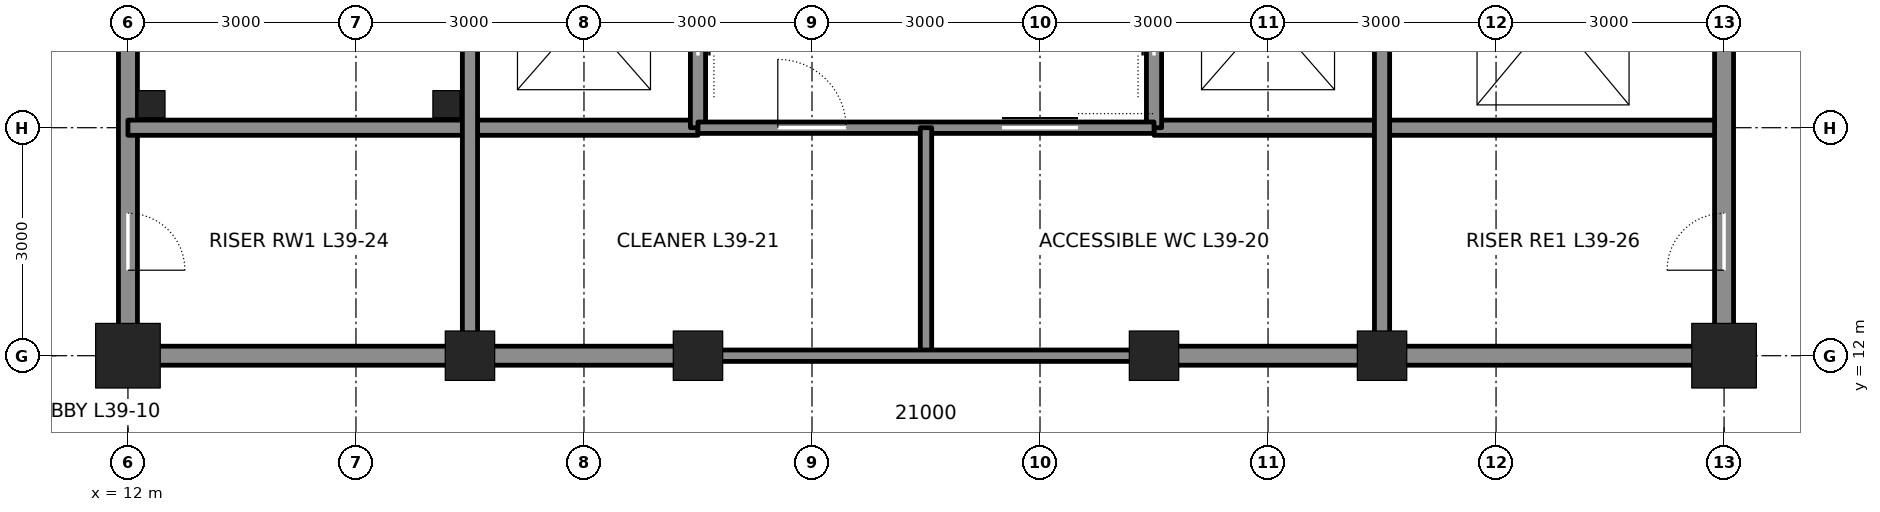
"""IFC4 building model, lengths in metres.
Left out: names, types, materials, properties, quantities, classifications, styles, units other than length and angle.
Written with IfcOpenShell. Run it as: python <this file> out.ifc"""

import sys

from ifc_helpers import new_model, si_unit, direction, frame, frame_2d, origin, origin_2d, place, context, subcontext, project, spatial, rectangle, hollow_rectangle, extrude, element, fill, save


model = new_model("IFC4")
c1 = context("Model", 3, precision=1e-05, world=origin(), true_north=direction((0.0, 1.0)))
c2 = subcontext(c1, "Body", "Model", "MODEL_VIEW")
j1 = project(units=[si_unit("LENGTHUNIT", "METRE"), si_unit("PLANEANGLEUNIT", "RADIAN")], contexts=[c1])
p1 = place(None, origin())
s1 = spatial("IfcSite", under=j1, at=p1, CompositionType="ELEMENT")
p2 = place(p1, origin())
s2 = spatial("IfcBuilding", under=s1, at=p2, CompositionType="ELEMENT")
p3 = place(p2, frame((0.0, 0.0, 180.0)))
s3 = spatial("IfcBuildingStorey", under=s2, at=p3, CompositionType="ELEMENT", Elevation=180.0)
p4 = place(p3, frame((12.0, 12.0, 0.0), z_axis=(0.0, 0.0, 1.0), x_axis=(1.0, 0.0, 0.0)))
e1 = element("IfcColumn", 1, at=p4, inside=s3, PredefinedType="COLUMN", context=c2, shape_type="SweptSolid", body=[
    extrude(hollow_rectangle(XDim=0.85, YDim=0.85, WallThickness=0.085, at=origin_2d()), origin(), (0.0, 0.0, 1.0), 4.5),
])
for number, where, z_axis, x_axis in (
    (2, (16.5, 12.0, 0.0), (0.0, 0.0, 1.0), (1.0, 0.0, 0.0)),
    (3, (19.5, 12.0, 0.0), (0.0, 0.0, 1.0), (1.0, 0.0, 0.0)),
    (4, (25.5, 12.0, 0.0), (0.0, 0.0, 1.0), (1.0, 0.0, 0.0)),
    (5, (28.5, 12.0, 0.0), (0.0, 0.0, 1.0), (1.0, 0.0, 0.0)),
):
    element("IfcColumn", number, at=place(p3, frame(where, z_axis=z_axis, x_axis=x_axis)), inside=s3, PredefinedType="COLUMN", context=c2, shape_type="SweptSolid", body=[
        extrude(hollow_rectangle(XDim=0.65, YDim=0.65, WallThickness=0.065, at=origin_2d()), origin(), (0.0, 0.0, 1.0), 4.5),
    ])
p5 = place(p3, frame((33.0, 12.0, 0.0), z_axis=(0.0, 0.0, 1.0), x_axis=(1.0, 0.0, 0.0)))
e6 = element("IfcColumn", 6, at=p5, inside=s3, PredefinedType="COLUMN", context=c2, shape_type="SweptSolid", body=[
    extrude(hollow_rectangle(XDim=0.85, YDim=0.85, WallThickness=0.085, at=origin_2d()), origin(), (0.0, 0.0, 1.0), 4.5),
])
p6 = place(p3, frame((12.0, 12.25, 0.0), z_axis=(0.0, 0.0, 1.0), x_axis=(0.0, 1.0, 0.0)))
e7 = element("IfcWall", 7, at=p6, inside=s3, PredefinedType="SOLIDWALL", context=c2, shape_type="SweptSolid", body=[
    extrude(rectangle(XDim=8.5, YDim=0.25, at=frame_2d((4.25, 0.0))), origin(), (0.0, 0.0, 1.0), 3.413),
])
p7 = place(p6, frame((0.875, 0.0, 0.0)))
e8 = element("IfcOpeningElement", 8, at=p7, cuts=e7, PredefinedType="OPENING", context=c2, shape_type="SweptSolid", body=[
    extrude(rectangle(XDim=0.75, YDim=2.1, at=frame_2d((0.375, 1.05))), frame((0.0, 0.135, 0.0), z_axis=(0.0, -1.0, 0.0), x_axis=(1.0, 0.0, 0.0)), (0.0, 0.0, 1.0), 0.27),
])
p8 = place(p3, frame((12.25, 12.0, 0.0), z_axis=(0.0, 0.0, 1.0), x_axis=(1.0, 0.0, 0.0)))
e9 = element("IfcWall", 9, at=p8, inside=s3, PredefinedType="SOLIDWALL", context=c2, shape_type="SweptSolid", body=[
    extrude(rectangle(XDim=4.0, YDim=0.25, at=frame_2d((2.0, 0.0))), origin(), (0.0, 0.0, 1.0), 3.481),
])
for number, where, z_axis, x_axis in (
    (10, (16.75, 12.0, 0.0), (0.0, 0.0, 1.0), (1.0, 0.0, 0.0)),
    (11, (25.75, 12.0, 0.0), (0.0, 0.0, 1.0), (1.0, 0.0, 0.0)),
):
    element("IfcWall", number, at=place(p3, frame(where, z_axis=z_axis, x_axis=x_axis)), inside=s3, PredefinedType="SOLIDWALL", context=c2, shape_type="SweptSolid", body=[
        extrude(rectangle(XDim=2.5, YDim=0.25, at=frame_2d((1.25, 0.0))), origin(), (0.0, 0.0, 1.0), 3.481),
    ])
p9 = place(p3, frame((28.75, 12.0, 0.0), z_axis=(0.0, 0.0, 1.0), x_axis=(1.0, 0.0, 0.0)))
e12 = element("IfcWall", 12, at=p9, inside=s3, PredefinedType="SOLIDWALL", context=c2, shape_type="SweptSolid", body=[
    extrude(rectangle(XDim=4.0, YDim=0.25, at=frame_2d((2.0, 0.0))), origin(), (0.0, 0.0, 1.0), 3.481),
])
for number, where, z_axis, x_axis in (
    (13, (12.0, 15.0, 0.0), (0.0, 0.0, 1.0), (1.0, 0.0, 0.0)),
    (14, (25.5, 15.0, 0.0), (0.0, 0.0, 1.0), (1.0, 0.0, 0.0)),
):
    element("IfcWall", number, at=place(p3, frame(where, z_axis=z_axis, x_axis=x_axis)), inside=s3, PredefinedType="SOLIDWALL", context=c2, shape_type="SweptSolid", body=[
        extrude(rectangle(XDim=7.5, YDim=0.2, at=frame_2d((3.75, 0.0))), origin(), (0.0, 0.0, 1.0), 4.34),
    ])
p10 = place(p3, frame((16.5, 12.25, 0.0), z_axis=(0.0, 0.0, 1.0), x_axis=(0.0, 1.0, 0.0)))
e15 = element("IfcWall", 15, at=p10, inside=s3, PredefinedType="SOLIDWALL", context=c2, shape_type="SweptSolid", body=[
    extrude(rectangle(XDim=8.5, YDim=0.2, at=frame_2d((4.25, 0.0))), origin(), (0.0, 0.0, 1.0), 3.413),
])
p11 = place(p3, frame((19.5, 15.0, 0.0), z_axis=(0.0, 0.0, 1.0), x_axis=(0.0, 1.0, 0.0)))
e16 = element("IfcWall", 16, at=p11, inside=s3, PredefinedType="SOLIDWALL", context=c2, shape_type="SweptSolid", body=[
    extrude(rectangle(XDim=12.0, YDim=0.2, at=frame_2d((6.0, 0.0))), origin(), (0.0, 0.0, 1.0), 3.365),
])
p12 = place(p11, frame((0.95, 0.0, 0.0)))
e17 = element("IfcOpeningElement", 17, at=p12, cuts=e16, PredefinedType="OPENING", context=c2, shape_type="SweptSolid", body=[
    extrude(rectangle(XDim=1.1, YDim=2.1, at=frame_2d((0.55, 1.05))), frame((0.0, 0.11, 0.0), z_axis=(0.0, -1.0, 0.0), x_axis=(1.0, 0.0, 0.0)), (0.0, 0.0, 1.0), 0.22),
])
p13 = place(p11, frame((3.95, 0.0, 0.0)))
e18 = element("IfcOpeningElement", 18, at=p13, cuts=e16, PredefinedType="OPENING", context=c2, shape_type="SweptSolid", body=[
    extrude(rectangle(XDim=1.1, YDim=2.1, at=frame_2d((0.55, 1.05))), frame((0.0, 0.11, 0.0), z_axis=(0.0, -1.0, 0.0), x_axis=(1.0, 0.0, 0.0)), (0.0, 0.0, 1.0), 0.22),
])
p14 = place(p11, frame((6.95, 0.0, 0.0)))
e19 = element("IfcOpeningElement", 19, at=p14, cuts=e16, PredefinedType="OPENING", context=c2, shape_type="SweptSolid", body=[
    extrude(rectangle(XDim=1.1, YDim=2.1, at=frame_2d((0.55, 1.05))), frame((0.0, 0.11, 0.0), z_axis=(0.0, -1.0, 0.0), x_axis=(1.0, 0.0, 0.0)), (0.0, 0.0, 1.0), 0.22),
])
p15 = place(p11, frame((9.95, 0.0, 0.0)))
e20 = element("IfcOpeningElement", 20, at=p15, cuts=e16, PredefinedType="OPENING", context=c2, shape_type="SweptSolid", body=[
    extrude(rectangle(XDim=1.1, YDim=2.1, at=frame_2d((0.55, 1.05))), frame((0.0, 0.11, 0.0), z_axis=(0.0, -1.0, 0.0), x_axis=(1.0, 0.0, 0.0)), (0.0, 0.0, 1.0), 0.22),
])
p16 = place(p3, frame((25.5, 15.0, 0.0), z_axis=(0.0, 0.0, 1.0), x_axis=(0.0, 1.0, 0.0)))
e21 = element("IfcWall", 21, at=p16, inside=s3, PredefinedType="SOLIDWALL", context=c2, shape_type="SweptSolid", body=[
    extrude(rectangle(XDim=12.0, YDim=0.2, at=frame_2d((6.0, 0.0))), origin(), (0.0, 0.0, 1.0), 3.365),
])
p17 = place(p16, frame((0.95, 0.0, 0.0)))
e22 = element("IfcOpeningElement", 22, at=p17, cuts=e21, PredefinedType="OPENING", context=c2, shape_type="SweptSolid", body=[
    extrude(rectangle(XDim=1.1, YDim=2.1, at=frame_2d((0.55, 1.05))), frame((0.0, 0.11, 0.0), z_axis=(0.0, -1.0, 0.0), x_axis=(1.0, 0.0, 0.0)), (0.0, 0.0, 1.0), 0.22),
])
p18 = place(p16, frame((3.95, 0.0, 0.0)))
e23 = element("IfcOpeningElement", 23, at=p18, cuts=e21, PredefinedType="OPENING", context=c2, shape_type="SweptSolid", body=[
    extrude(rectangle(XDim=1.1, YDim=2.1, at=frame_2d((0.55, 1.05))), frame((0.0, 0.11, 0.0), z_axis=(0.0, -1.0, 0.0), x_axis=(1.0, 0.0, 0.0)), (0.0, 0.0, 1.0), 0.22),
])
p19 = place(p16, frame((6.95, 0.0, 0.0)))
e24 = element("IfcOpeningElement", 24, at=p19, cuts=e21, PredefinedType="OPENING", context=c2, shape_type="SweptSolid", body=[
    extrude(rectangle(XDim=1.1, YDim=2.1, at=frame_2d((0.55, 1.05))), frame((0.0, 0.11, 0.0), z_axis=(0.0, -1.0, 0.0), x_axis=(1.0, 0.0, 0.0)), (0.0, 0.0, 1.0), 0.22),
])
p20 = place(p16, frame((9.95, 0.0, 0.0)))
e25 = element("IfcOpeningElement", 25, at=p20, cuts=e21, PredefinedType="OPENING", context=c2, shape_type="SweptSolid", body=[
    extrude(rectangle(XDim=1.1, YDim=2.1, at=frame_2d((0.55, 1.05))), frame((0.0, 0.11, 0.0), z_axis=(0.0, -1.0, 0.0), x_axis=(1.0, 0.0, 0.0)), (0.0, 0.0, 1.0), 0.22),
])
p21 = place(p3, frame((28.5, 12.25, 0.0), z_axis=(0.0, 0.0, 1.0), x_axis=(0.0, 1.0, 0.0)))
e26 = element("IfcWall", 26, at=p21, inside=s3, PredefinedType="SOLIDWALL", context=c2, shape_type="SweptSolid", body=[
    extrude(rectangle(XDim=8.5, YDim=0.2, at=frame_2d((4.25, 0.0))), origin(), (0.0, 0.0, 1.0), 3.413),
])
p22 = place(p3, frame((33.0, 12.25, 0.0), z_axis=(0.0, 0.0, 1.0), x_axis=(0.0, 1.0, 0.0)))
e27 = element("IfcWall", 27, at=p22, inside=s3, PredefinedType="SOLIDWALL", context=c2, shape_type="SweptSolid", body=[
    extrude(rectangle(XDim=8.5, YDim=0.25, at=frame_2d((4.25, 0.0))), origin(), (0.0, 0.0, 1.0), 3.413),
])
p23 = place(p22, frame((6.65, 0.0, 0.0)))
e28 = element("IfcOpeningElement", 28, at=p23, cuts=e27, PredefinedType="OPENING", context=c2, shape_type="SweptSolid", body=[
    extrude(rectangle(XDim=1.2, YDim=2.1, at=frame_2d((0.6, 1.05))), frame((0.0, 0.135, 0.0), z_axis=(0.0, -1.0, 0.0), x_axis=(1.0, 0.0, 0.0)), (0.0, 0.0, 1.0), 0.27),
])
p24 = place(p22, frame((0.875, 0.0, 0.0)))
e29 = element("IfcOpeningElement", 29, at=p24, cuts=e27, PredefinedType="OPENING", context=c2, shape_type="SweptSolid", body=[
    extrude(rectangle(XDim=0.75, YDim=2.1, at=frame_2d((0.375, 1.05))), frame((0.0, 0.135, 0.0), z_axis=(0.0, -1.0, 0.0), x_axis=(1.0, 0.0, 0.0)), (0.0, 0.0, 1.0), 0.27),
])
p25 = place(p3, frame((19.5, 15.0, 0.0), z_axis=(0.0, 0.0, 1.0), x_axis=(1.0, 0.0, 0.0)))
e30 = element("IfcWall", 30, at=p25, inside=s3, PredefinedType="PARTITIONING", context=c2, shape_type="SweptSolid", body=[
    extrude(rectangle(XDim=6.0, YDim=0.15, at=frame_2d((3.0, 0.0))), origin(), (0.0, 0.0, 1.0), 4.34),
])
p26 = place(p25, frame((4.0, 0.0, 0.0)))
e31 = element("IfcOpeningElement", 31, at=p26, cuts=e30, PredefinedType="OPENING", context=c2, shape_type="SweptSolid", body=[
    extrude(rectangle(XDim=1.0, YDim=2.1, at=frame_2d((0.5, 1.05))), frame((0.0, 0.085, 0.0), z_axis=(0.0, -1.0, 0.0), x_axis=(1.0, 0.0, 0.0)), (0.0, 0.0, 1.0), 0.17),
])
p27 = place(p25, frame((1.05, 0.0, 0.0)))
e32 = element("IfcOpeningElement", 32, at=p27, cuts=e30, PredefinedType="OPENING", context=c2, shape_type="SweptSolid", body=[
    extrude(rectangle(XDim=0.9, YDim=2.1, at=frame_2d((0.45, 1.05))), frame((0.0, 0.085, 0.0), z_axis=(0.0, -1.0, 0.0), x_axis=(1.0, 0.0, 0.0)), (0.0, 0.0, 1.0), 0.17),
])
p28 = place(p3, frame((22.5, 15.0, 0.0), z_axis=(0.0, 0.0, 1.0), x_axis=(0.0, -1.0, 0.0)))
e33 = element("IfcWall", 33, at=p28, inside=s3, PredefinedType="PARTITIONING", context=c2, shape_type="SweptSolid", body=[
    extrude(rectangle(XDim=3.0, YDim=0.15, at=frame_2d((1.5, 0.0))), origin(), (0.0, 0.0, 1.0), 4.34),
])
p29 = place(p3, frame((19.5, 12.0, 0.0), z_axis=(0.0, 0.0, 1.0), x_axis=(1.0, 0.0, 0.0)))
e34 = element("IfcWall", 34, at=p29, inside=s3, PredefinedType="PARTITIONING", context=c2, shape_type="SweptSolid", body=[
    extrude(rectangle(XDim=6.0, YDim=0.15, at=frame_2d((3.0, 0.0))), origin(), (0.0, 0.0, 1.0), 3.481),
])
for number, where, z_axis, x_axis in (
    (35, (12.31, 15.31, 0.0), (0.0, 0.0, 1.0), (1.0, 0.0, 0.0)),
    (36, (16.19, 15.31, 0.0), (0.0, 0.0, 1.0), (1.0, 0.0, 0.0)),
):
    element("IfcColumn", number, at=place(p3, frame(where, z_axis=z_axis, x_axis=x_axis)), inside=s3, PredefinedType="COLUMN", context=c2, shape_type="SweptSolid", body=[
        extrude(hollow_rectangle(XDim=0.356, YDim=0.356, WallThickness=0.015, at=origin_2d()), origin(), (0.0, 0.0, 1.0), 4.5),
    ])
p30 = place(p7, frame((0.75, 0.0, 0.0), z_axis=(0.0, 0.0, 1.0), x_axis=(-1.0, 0.0, 0.0)))
e37 = element("IfcDoor", 37, at=p30, inside=s3, OperationType="SINGLE_SWING_RIGHT", PredefinedType="DOOR", context=c2, shape_type="SweptSolid", body=[
    extrude(rectangle(XDim=0.75, YDim=2.1, at=frame_2d((0.375, 1.05))), frame((0.0, 0.025, 0.0), z_axis=(0.0, -1.0, 0.0), x_axis=(1.0, 0.0, 0.0)), (0.0, 0.0, 1.0), 0.05),
])
fill(e8, e37)
p31 = place(p24, origin())
e38 = element("IfcDoor", 38, at=p31, inside=s3, OperationType="SINGLE_SWING_LEFT", PredefinedType="DOOR", context=c2, shape_type="SweptSolid", body=[
    extrude(rectangle(XDim=0.75, YDim=2.1, at=frame_2d((0.375, 1.05))), frame((0.0, 0.025, 0.0), z_axis=(0.0, -1.0, 0.0), x_axis=(1.0, 0.0, 0.0)), (0.0, 0.0, 1.0), 0.05),
])
fill(e29, e38)
p32 = place(p26, origin())
e39 = element("IfcDoor", 39, at=p32, inside=s3, OperationType="SLIDING_TO_LEFT", PredefinedType="DOOR", context=c2, shape_type="SweptSolid", body=[
    extrude(rectangle(XDim=1.0, YDim=2.1, at=frame_2d((0.5, 1.05))), frame((0.0, 0.025, 0.0), z_axis=(0.0, -1.0, 0.0), x_axis=(1.0, 0.0, 0.0)), (0.0, 0.0, 1.0), 0.05),
])
fill(e31, e39)
p33 = place(p27, origin())
e40 = element("IfcDoor", 40, at=p33, inside=s3, OperationType="SINGLE_SWING_LEFT", PredefinedType="DOOR", context=c2, shape_type="SweptSolid", body=[
    extrude(rectangle(XDim=0.9, YDim=2.1, at=frame_2d((0.45, 1.05))), frame((0.0, 0.025, 0.0), z_axis=(0.0, -1.0, 0.0), x_axis=(1.0, 0.0, 0.0)), (0.0, 0.0, 1.0), 0.05),
])
fill(e32, e40)
p34 = place(p12, origin())
e41 = element("IfcDoor", 41, at=p34, inside=s3, OperationType="DOUBLE_DOOR_SLIDING", PredefinedType="DOOR", context=c2, shape_type="SweptSolid", body=[
    extrude(rectangle(XDim=1.1, YDim=2.1, at=frame_2d((0.55, 1.05))), frame((0.0, 0.025, 0.0), z_axis=(0.0, -1.0, 0.0), x_axis=(1.0, 0.0, 0.0)), (0.0, 0.0, 1.0), 0.05),
])
fill(e17, e41)
p35 = place(p17, origin())
e42 = element("IfcDoor", 42, at=p35, inside=s3, OperationType="DOUBLE_DOOR_SLIDING", PredefinedType="DOOR", context=c2, shape_type="SweptSolid", body=[
    extrude(rectangle(XDim=1.1, YDim=2.1, at=frame_2d((0.55, 1.05))), frame((0.0, 0.025, 0.0), z_axis=(0.0, -1.0, 0.0), x_axis=(1.0, 0.0, 0.0)), (0.0, 0.0, 1.0), 0.05),
])
fill(e22, e42)
save(model, sys.argv[1])
